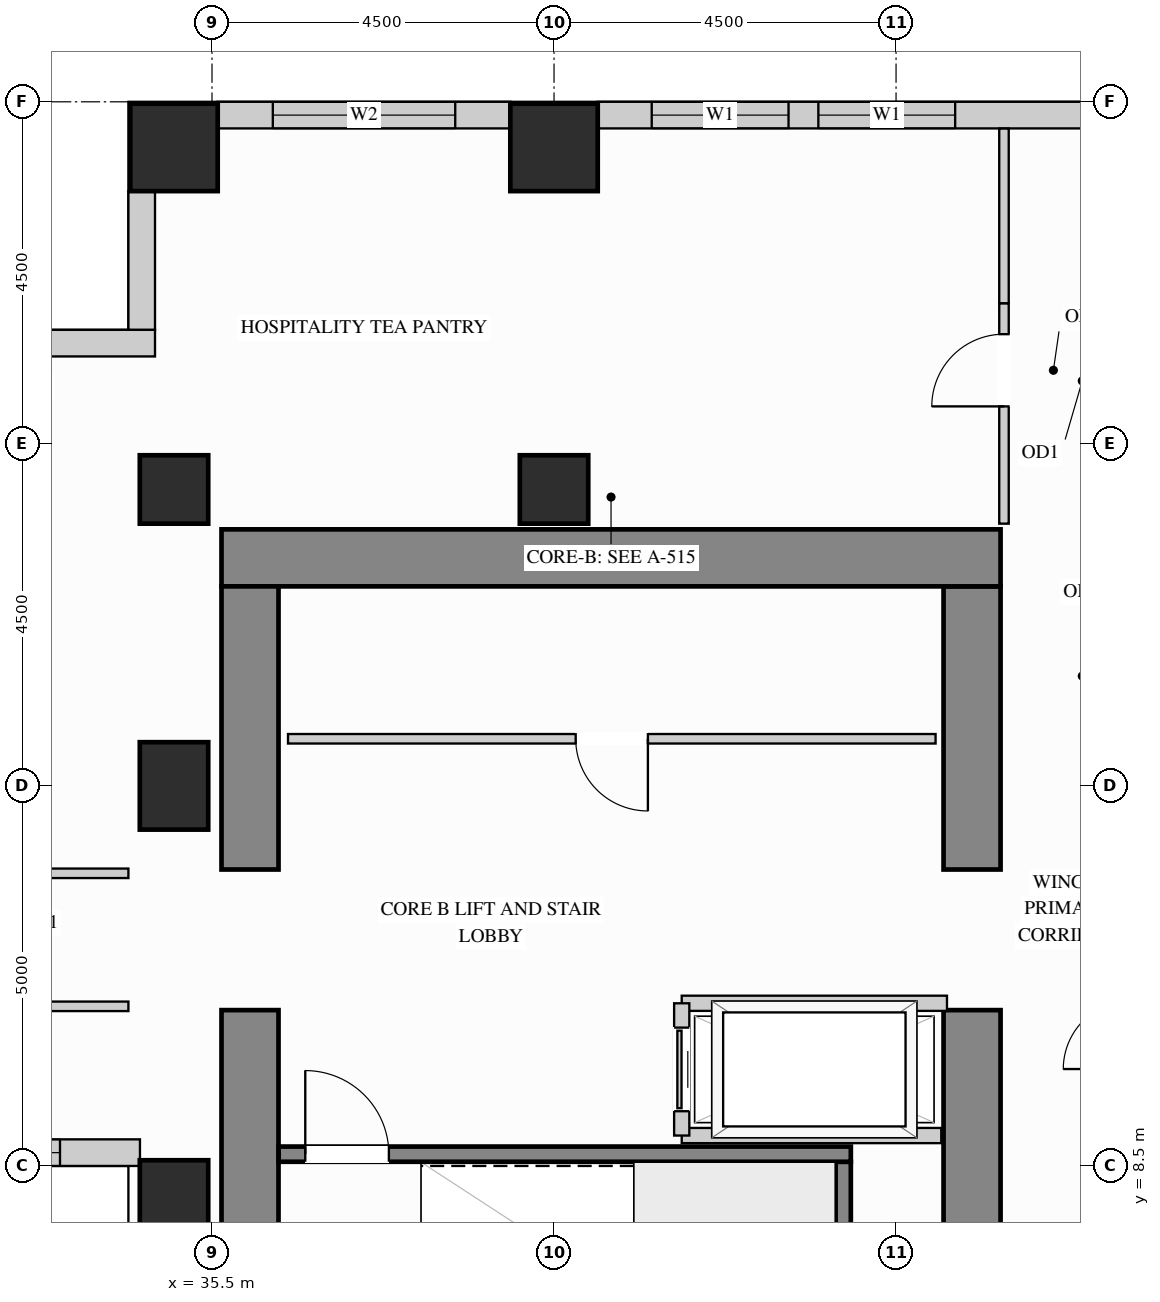
"""IFC4 building model, lengths in metres.
Left out: names, types, materials, properties, quantities, classifications, styles, units other than length and angle.
Written with IfcOpenShell. Run it as: python <this file> out.ifc"""

import sys

from ifc_helpers import new_model, si_unit, direction, frame, frame_2d, origin, origin_2d, place, context, subcontext, project, spatial, rectangle, extrude, source, transform, mapped, element, fill, save


model = new_model("IFC4")
c1 = context("Model", 3, precision=1e-05, world=origin(), true_north=direction((0.0, 1.0)))
c2 = subcontext(c1, "Body", "Model", "MODEL_VIEW")
j1 = project(units=[si_unit("LENGTHUNIT", "METRE"), si_unit("PLANEANGLEUNIT", "RADIAN")], contexts=[c1])
p1 = place(None, origin())
s1 = spatial("IfcSite", under=j1, at=p1, CompositionType="ELEMENT")
p2 = place(p1, origin())
s2 = spatial("IfcBuilding", under=s1, at=p2, CompositionType="ELEMENT")
p3 = place(p2, frame((0.0, 0.0, 124.2)))
s3 = spatial("IfcBuildingStorey", under=s2, at=p3, CompositionType="ELEMENT", Elevation=124.2)
m1 = source(origin(), c2, "Body", "SweptSolid", [
    extrude(rectangle(XDim=0.9, YDim=0.9, at=origin_2d()), origin(), (0.0, 0.0, 1.0), 3.38),
])
for number, where, z_axis, x_axis in (
    (1, (35.0, 17.4, 0.0), (0.0, 0.0, 1.0), (1.0, 0.0, 0.0)),
    (2, (40.0, 17.4, 0.0), (0.0, 0.0, 1.0), (1.0, 0.0, 0.0)),
):
    element("IfcColumn", number, at=place(p3, frame(where, z_axis=z_axis, x_axis=x_axis)), inside=s3, PredefinedType="COLUMN", context=c2, shape_type="MappedRepresentation", body=[
        mapped(m1, transform((0.0, 0.0, 0.0), x_axis=(1.0, 0.0, 0.0), y_axis=(0.0, 1.0, 0.0), z_axis=(0.0, 0.0, 1.0))),
    ])
m2 = source(origin(), c2, "Body", "SweptSolid", [
    extrude(rectangle(XDim=0.9, YDim=1.15, at=origin_2d()), origin(), (0.0, 0.0, 1.0), 3.38),
])
for number, where, z_axis, x_axis in (
    (3, (35.0, 13.5, 0.0), (0.0, 0.0, 1.0), (1.0, 0.0, 0.0)),
    (4, (35.0, 8.0, 0.0), (0.0, 0.0, 1.0), (1.0, 0.0, 0.0)),
):
    element("IfcColumn", number, at=place(p3, frame(where, z_axis=z_axis, x_axis=x_axis)), inside=s3, PredefinedType="COLUMN", context=c2, shape_type="MappedRepresentation", body=[
        mapped(m2, transform((0.0, 0.0, 0.0), x_axis=(1.0, 0.0, 0.0), y_axis=(0.0, 1.0, 0.0), z_axis=(0.0, 0.0, 1.0))),
    ])
m3 = source(origin(), c2, "Body", "SweptSolid", [
    extrude(rectangle(XDim=1.15, YDim=1.15, at=origin_2d()), origin(), (0.0, 0.0, 1.0), 3.38),
])
for number, where, z_axis, x_axis in (
    (5, (35.0, 21.9, 0.0), (0.0, 0.0, 1.0), (1.0, 0.0, 0.0)),
    (6, (40.0, 21.9, 0.0), (0.0, 0.0, 1.0), (1.0, 0.0, 0.0)),
):
    element("IfcColumn", number, at=place(p3, frame(where, z_axis=z_axis, x_axis=x_axis)), inside=s3, PredefinedType="COLUMN", context=c2, shape_type="MappedRepresentation", body=[
        mapped(m3, transform((0.0, 0.0, 0.0), x_axis=(1.0, 0.0, 0.0), y_axis=(0.0, 1.0, 0.0), z_axis=(0.0, 0.0, 1.0))),
    ])
m4 = source(origin(), c2, "Body", "SweptSolid", [
    extrude(rectangle(XDim=5.675, YDim=0.75, at=frame_2d((2.837, 0.0))), origin(), (0.0, 0.0, 1.0), 3.38),
])
p4 = place(p3, frame((45.5, 4.875, 0.0), z_axis=(0.0, 0.0, 1.0), x_axis=(0.0, 1.0, 0.0)))
e7 = element("IfcWall", 7, at=p4, inside=s3, PredefinedType="SHEAR", context=c2, shape_type="MappedRepresentation", body=[
    mapped(m4, transform((0.0, 0.0, 0.0), x_axis=(1.0, 0.0, 0.0), y_axis=(0.0, 1.0, 0.0), z_axis=(0.0, 0.0, 1.0))),
])
m5 = source(origin(), c2, "Body", "SweptSolid", [
    extrude(rectangle(XDim=3.725, YDim=0.75, at=frame_2d((1.863, 0.0))), origin(), (0.0, 0.0, 1.0), 3.38),
])
p5 = place(p3, frame((45.5, 12.4, 0.0), z_axis=(0.0, 0.0, 1.0), x_axis=(0.0, 1.0, 0.0)))
e8 = element("IfcWall", 8, at=p5, inside=s3, PredefinedType="SHEAR", context=c2, shape_type="MappedRepresentation", body=[
    mapped(m5, transform((0.0, 0.0, 0.0), x_axis=(1.0, 0.0, 0.0), y_axis=(0.0, 1.0, 0.0), z_axis=(0.0, 0.0, 1.0))),
])
m6 = source(origin(), c2, "Body", "SweptSolid", [
    extrude(rectangle(XDim=10.25, YDim=0.75, at=frame_2d((5.125, 0.0))), origin(), (0.0, 0.0, 1.0), 3.38),
])
p6 = place(p3, frame((35.625, 16.5, 0.0), z_axis=(0.0, 0.0, 1.0), x_axis=(1.0, 0.0, 0.0)))
e9 = element("IfcWall", 9, at=p6, inside=s3, PredefinedType="SHEAR", context=c2, shape_type="MappedRepresentation", body=[
    mapped(m6, transform((0.0, 0.0, 0.0), x_axis=(1.0, 0.0, 0.0), y_axis=(0.0, 1.0, 0.0), z_axis=(0.0, 0.0, 1.0))),
])
p7 = place(p3, frame((36.0, 4.875, 0.0), z_axis=(0.0, 0.0, 1.0), x_axis=(0.0, 1.0, 0.0)))
e10 = element("IfcWall", 10, at=p7, inside=s3, PredefinedType="SHEAR", context=c2, shape_type="MappedRepresentation", body=[
    mapped(m4, transform((0.0, 0.0, 0.0), x_axis=(1.0, 0.0, 0.0), y_axis=(0.0, 1.0, 0.0), z_axis=(0.0, 0.0, 1.0))),
])
p8 = place(p3, frame((36.0, 12.4, 0.0), z_axis=(0.0, 0.0, 1.0), x_axis=(0.0, 1.0, 0.0)))
e11 = element("IfcWall", 11, at=p8, inside=s3, PredefinedType="SHEAR", context=c2, shape_type="MappedRepresentation", body=[
    mapped(m5, transform((0.0, 0.0, 0.0), x_axis=(1.0, 0.0, 0.0), y_axis=(0.0, 1.0, 0.0), z_axis=(0.0, 0.0, 1.0))),
])
p9 = place(p3, frame((30.948, 8.675, 0.0), z_axis=(0.0, 0.0, 1.0), x_axis=(1.0, 0.0, 0.0)))
e12 = element("IfcWall", 12, at=p9, inside=s3, PredefinedType="SOLIDWALL", context=c2, shape_type="SweptSolid", body=[
    extrude(rectangle(XDim=3.604, YDim=0.35, at=frame_2d((1.802, 0.0))), origin(), (0.0, 0.0, 1.0), 3.365),
])
p10 = place(p9, frame((1.052, 0.0, 0.78)))
e13 = element("IfcOpeningElement", 13, at=p10, cuts=e12, PredefinedType="OPENING", context=c2, shape_type="SweptSolid", body=[
    extrude(rectangle(XDim=1.5, YDim=2.0, at=frame_2d((0.75, 1.0))), frame((0.0, 0.185, 0.0), z_axis=(0.0, -1.0, 0.0), x_axis=(1.0, 0.0, 0.0)), (0.0, 0.0, 1.0), 0.37),
])
p11 = place(p3, frame((47.027, 22.325, 0.0), z_axis=(0.0, 0.0, 1.0), x_axis=(-1.0, 0.0, 0.0)))
e14 = element("IfcWall", 14, at=p11, inside=s3, PredefinedType="SOLIDWALL", context=c2, shape_type="SweptSolid", body=[
    extrude(rectangle(XDim=6.454, YDim=0.35, at=frame_2d((3.227, 0.0))), origin(), (0.0, 0.0, 1.0), 3.365),
])
p12 = place(p11, frame((1.749, 0.0, 0.78)))
e15 = element("IfcOpeningElement", 15, at=p12, cuts=e14, PredefinedType="OPENING", context=c2, shape_type="SweptSolid", body=[
    extrude(rectangle(XDim=1.8, YDim=2.1, at=frame_2d((0.9, 1.05))), frame((0.0, 0.185, 0.0), z_axis=(0.0, -1.0, 0.0), x_axis=(1.0, 0.0, 0.0)), (0.0, 0.0, 1.0), 0.37),
])
p13 = place(p11, frame((3.942, 0.0, 0.78)))
e16 = element("IfcOpeningElement", 16, at=p13, cuts=e14, PredefinedType="OPENING", context=c2, shape_type="SweptSolid", body=[
    extrude(rectangle(XDim=1.8, YDim=2.1, at=frame_2d((0.9, 1.05))), frame((0.0, 0.185, 0.0), z_axis=(0.0, -1.0, 0.0), x_axis=(1.0, 0.0, 0.0)), (0.0, 0.0, 1.0), 0.37),
])
p14 = place(p3, frame((39.427, 22.325, 0.0), z_axis=(0.0, 0.0, 1.0), x_axis=(-1.0, 0.0, 0.0)))
e17 = element("IfcWall", 17, at=p14, inside=s3, PredefinedType="SOLIDWALL", context=c2, shape_type="SweptSolid", body=[
    extrude(rectangle(XDim=3.854, YDim=0.35, at=frame_2d((1.927, 0.0))), origin(), (0.0, 0.0, 1.0), 3.365),
])
p15 = place(p14, frame((0.727, 0.0, 0.78)))
e18 = element("IfcOpeningElement", 18, at=p15, cuts=e17, PredefinedType="OPENING", context=c2, shape_type="SweptSolid", body=[
    extrude(rectangle(XDim=2.4, YDim=2.1, at=frame_2d((1.2, 1.05))), frame((0.0, 0.185, 0.0), z_axis=(0.0, -1.0, 0.0), x_axis=(1.0, 0.0, 0.0)), (0.0, 0.0, 1.0), 0.37),
])
m7 = source(origin(), c2, "Body", "SweptSolid", [
    extrude(rectangle(XDim=1.829, YDim=0.35, at=frame_2d((0.915, 0.0))), origin(), (0.0, 0.0, 1.0), 3.365),
])
p16 = place(p3, frame((34.575, 21.327, 0.0), z_axis=(0.0, 0.0, 1.0), x_axis=(0.0, -1.0, 0.0)))
e19 = element("IfcWall", 19, at=p16, inside=s3, PredefinedType="SOLIDWALL", context=c2, shape_type="MappedRepresentation", body=[
    mapped(m7, transform((0.0, 0.0, 0.0), x_axis=(1.0, 0.0, 0.0), y_axis=(0.0, 1.0, 0.0), z_axis=(0.0, 0.0, 1.0))),
])
p17 = place(p3, frame((34.75, 19.325, 0.0), z_axis=(0.0, 0.0, 1.0), x_axis=(-1.0, 0.0, 0.0)))
e20 = element("IfcWall", 20, at=p17, inside=s3, PredefinedType="SOLIDWALL", context=c2, shape_type="SweptSolid", body=[
    extrude(rectangle(XDim=15.6, YDim=0.35, at=frame_2d((7.8, 0.0))), origin(), (0.0, 0.0, 1.0), 3.365),
])
p18 = place(p17, frame((4.307, 0.0, 0.78)))
e21 = element("IfcOpeningElement", 21, at=p18, cuts=e20, PredefinedType="OPENING", context=c2, shape_type="SweptSolid", body=[
    extrude(rectangle(XDim=1.5, YDim=2.0, at=frame_2d((0.75, 1.0))), frame((0.0, 0.185, 0.0), z_axis=(0.0, -1.0, 0.0), x_axis=(1.0, 0.0, 0.0)), (0.0, 0.0, 1.0), 0.37),
])
p19 = place(p17, frame((9.793, 0.0, 0.78)))
e22 = element("IfcOpeningElement", 22, at=p19, cuts=e20, PredefinedType="OPENING", context=c2, shape_type="SweptSolid", body=[
    extrude(rectangle(XDim=1.5, YDim=2.0, at=frame_2d((0.75, 1.0))), frame((0.0, 0.185, 0.0), z_axis=(0.0, -1.0, 0.0), x_axis=(1.0, 0.0, 0.0)), (0.0, 0.0, 1.0), 0.37),
])
p20 = place(p3, frame((36.5, 14.12, 0.0), z_axis=(0.0, 0.0, 1.0), x_axis=(1.0, 0.0, 0.0)))
e23 = element("IfcWall", 23, at=p20, inside=s3, PredefinedType="PARTITIONING", context=c2, shape_type="SweptSolid", body=[
    extrude(rectangle(XDim=8.52, YDim=0.125, at=frame_2d((4.26, 0.0))), origin(), (0.0, 0.0, 1.0), 3.365),
])
p21 = place(p20, frame((3.785, 0.0, 0.0)))
e24 = element("IfcOpeningElement", 24, at=p21, cuts=e23, PredefinedType="OPENING", context=c2, shape_type="SweptSolid", body=[
    extrude(rectangle(XDim=0.95, YDim=2.15, at=frame_2d((0.475, 1.075))), frame((0.0, 0.073, 0.0), z_axis=(0.0, -1.0, 0.0), x_axis=(1.0, 0.0, 0.0)), (0.0, 0.0, 1.0), 0.145),
])
p22 = place(p3, frame((45.92, 16.95, 0.0), z_axis=(0.0, 0.0, 1.0), x_axis=(0.0, 1.0, 0.0)))
e25 = element("IfcWall", 25, at=p22, inside=s3, PredefinedType="PARTITIONING", context=c2, shape_type="SweptSolid", body=[
    extrude(rectangle(XDim=2.9, YDim=0.125, at=frame_2d((1.45, 0.0))), origin(), (0.0, 0.0, 1.0), 3.365),
])
p23 = place(p22, frame((1.543, 0.0, 0.0)))
e26 = element("IfcOpeningElement", 26, at=p23, cuts=e25, PredefinedType="OPENING", context=c2, shape_type="SweptSolid", body=[
    extrude(rectangle(XDim=0.95, YDim=2.15, at=frame_2d((0.475, 1.075))), frame((0.0, 0.073, 0.0), z_axis=(0.0, -1.0, 0.0), x_axis=(1.0, 0.0, 0.0)), (0.0, 0.0, 1.0), 0.145),
])
m8 = source(origin(), c2, "Body", "SweptSolid", [
    extrude(rectangle(XDim=2.298, YDim=0.125, at=frame_2d((1.149, 0.0))), origin(), (0.0, 0.0, 1.0), 3.365),
])
p24 = place(p3, frame((45.92, 19.85, 0.0), z_axis=(0.0, 0.0, 1.0), x_axis=(0.0, 1.0, 0.0)))
e27 = element("IfcWall", 27, at=p24, inside=s3, PredefinedType="PARTITIONING", context=c2, shape_type="MappedRepresentation", body=[
    mapped(m8, transform((0.0, 0.0, 0.0), x_axis=(1.0, 0.0, 0.0), y_axis=(0.0, 1.0, 0.0), z_axis=(0.0, 0.0, 1.0))),
])
p25 = place(p3, frame((29.85, 12.35, 0.0), z_axis=(0.0, 0.0, 1.0), x_axis=(1.0, 0.0, 0.0)))
e28 = element("IfcWall", 28, at=p25, inside=s3, PredefinedType="PARTITIONING", context=c2, shape_type="SweptSolid", body=[
    extrude(rectangle(XDim=4.55, YDim=0.125, at=frame_2d((2.275, 0.0))), origin(), (0.0, 0.0, 1.0), 3.365),
])
p26 = place(p25, frame((1.8, 0.0, 0.0)))
e29 = element("IfcOpeningElement", 29, at=p26, cuts=e28, PredefinedType="OPENING", context=c2, shape_type="SweptSolid", body=[
    extrude(rectangle(XDim=0.95, YDim=2.15, at=frame_2d((0.475, 1.075))), frame((0.0, 0.073, 0.0), z_axis=(0.0, -1.0, 0.0), x_axis=(1.0, 0.0, 0.0)), (0.0, 0.0, 1.0), 0.145),
])
p27 = place(p3, frame((26.95, 10.6, 0.0), z_axis=(0.0, 0.0, 1.0), x_axis=(1.0, 0.0, 0.0)))
e30 = element("IfcWall", 30, at=p27, inside=s3, PredefinedType="PARTITIONING", context=c2, shape_type="SweptSolid", body=[
    extrude(rectangle(XDim=7.45, YDim=0.125, at=frame_2d((3.725, 0.0))), origin(), (0.0, 0.0, 1.0), 3.365),
])
p28 = place(p27, frame((4.683, 0.0, 0.0)))
e31 = element("IfcOpeningElement", 31, at=p28, cuts=e30, PredefinedType="OPENING", context=c2, shape_type="SweptSolid", body=[
    extrude(rectangle(XDim=0.95, YDim=2.15, at=frame_2d((0.475, 1.075))), frame((0.0, 0.073, 0.0), z_axis=(0.0, -1.0, 0.0), x_axis=(1.0, 0.0, 0.0)), (0.0, 0.0, 1.0), 0.145),
])
m9 = source(origin(), c2, "Body", "SweptSolid", [
    extrude(rectangle(XDim=3.49, YDim=0.2, at=frame_2d((1.745, 0.0))), origin(), (0.0, 0.0, 1.0), 3.365),
])
p29 = place(p3, frame((41.68, 10.64, 0.0), z_axis=(0.0, 0.0, 1.0), x_axis=(1.0, 0.0, 0.0)))
e32 = element("IfcWall", 32, at=p29, inside=s3, PredefinedType="PARTITIONING", context=c2, shape_type="MappedRepresentation", body=[
    mapped(m9, transform((0.0, 0.0, 0.0), x_axis=(1.0, 0.0, 0.0), y_axis=(0.0, 1.0, 0.0), z_axis=(0.0, 0.0, 1.0))),
])
m10 = source(origin(), c2, "Body", "SweptSolid", [
    extrude(rectangle(XDim=3.415, YDim=0.2, at=frame_2d((1.708, 0.0))), origin(), (0.0, 0.0, 1.0), 3.365),
])
p30 = place(p3, frame((41.68, 8.9, 0.0), z_axis=(0.0, 0.0, 1.0), x_axis=(1.0, 0.0, 0.0)))
e33 = element("IfcWall", 33, at=p30, inside=s3, PredefinedType="PARTITIONING", context=c2, shape_type="MappedRepresentation", body=[
    mapped(m10, transform((0.0, 0.0, 0.0), x_axis=(1.0, 0.0, 0.0), y_axis=(0.0, 1.0, 0.0), z_axis=(0.0, 0.0, 1.0))),
])
p31 = place(p3, frame((41.68, 8.9, 0.0), z_axis=(0.0, 0.0, 1.0), x_axis=(0.0, 1.0, 0.0)))
e34 = element("IfcWall", 34, at=p31, inside=s3, PredefinedType="PARTITIONING", context=c2, shape_type="SweptSolid", body=[
    extrude(rectangle(XDim=1.74, YDim=0.2, at=frame_2d((0.87, 0.0))), origin(), (0.0, 0.0, 1.0), 3.365),
])
p32 = place(p31, frame((0.32, 0.0, 0.0)))
e35 = element("IfcOpeningElement", 35, at=p32, cuts=e34, PredefinedType="OPENING", context=c2, shape_type="SweptSolid", body=[
    extrude(rectangle(XDim=1.1, YDim=2.2, at=frame_2d((0.55, 1.1))), frame((0.0, 0.11, 0.0), z_axis=(0.0, -1.0, 0.0), x_axis=(1.0, 0.0, 0.0)), (0.0, 0.0, 1.0), 0.22),
])
m11 = source(origin(), c2, "Body", "SweptSolid", [
    extrude(rectangle(XDim=3.678, YDim=0.2, at=frame_2d((1.839, 0.0))), origin(), (0.0, 0.0, 1.0), 3.38),
])
p33 = place(p3, frame((43.805, 4.877, 0.0), z_axis=(0.0, 0.0, 1.0), x_axis=(0.0, 1.0, 0.0)))
e36 = element("IfcWall", 36, at=p33, inside=s3, PredefinedType="SHEAR", context=c2, shape_type="MappedRepresentation", body=[
    mapped(m11, transform((0.0, 0.0, 0.0), x_axis=(1.0, 0.0, 0.0), y_axis=(0.0, 1.0, 0.0), z_axis=(0.0, 0.0, 1.0))),
])
p34 = place(p3, frame((36.377, 8.655, 0.0), z_axis=(0.0, 0.0, 1.0), x_axis=(1.0, 0.0, 0.0)))
e37 = element("IfcWall", 37, at=p34, inside=s3, PredefinedType="SHEAR", context=c2, shape_type="SweptSolid", body=[
    extrude(rectangle(XDim=7.528, YDim=0.2, at=frame_2d((3.764, 0.0))), origin(), (0.0, 0.0, 1.0), 3.38),
])
p35 = place(p34, frame((0.35, 0.0, 0.0)))
e38 = element("IfcOpeningElement", 38, at=p35, cuts=e37, PredefinedType="OPENING", context=c2, shape_type="SweptSolid", body=[
    extrude(rectangle(XDim=1.1, YDim=2.15, at=frame_2d((0.55, 1.075))), frame((0.0, 0.11, 0.0), z_axis=(0.0, -1.0, 0.0), x_axis=(1.0, 0.0, 0.0)), (0.0, 0.0, 1.0), 0.22),
])
m12 = source(origin(), c2, "Body", "SweptSolid", [
    extrude(rectangle(XDim=1.1, YDim=2.2, at=frame_2d((0.55, 1.1))), frame((0.0, 0.025, 0.0), z_axis=(0.0, -1.0, 0.0), x_axis=(1.0, 0.0, 0.0)), (0.0, 0.0, 1.0), 0.05),
])
p36 = place(p32, origin())
e39 = element("IfcDoor", 39, at=p36, inside=s3, OperationType="SLIDING_TO_LEFT", PredefinedType="DOOR", context=c2, shape_type="MappedRepresentation", body=[
    mapped(m12, transform((0.0, 0.0, 0.0), x_axis=(1.0, 0.0, 0.0), y_axis=(0.0, 1.0, 0.0), z_axis=(0.0, 0.0, 1.0))),
])
fill(e35, e39)
m13 = source(origin(), c2, "Body", "SweptSolid", [
    extrude(rectangle(XDim=0.95, YDim=2.15, at=frame_2d((0.475, 1.075))), frame((0.0, 0.025, 0.0), z_axis=(0.0, -1.0, 0.0), x_axis=(1.0, 0.0, 0.0)), (0.0, 0.0, 1.0), 0.05),
])
p37 = place(p21, origin())
e40 = element("IfcDoor", 40, at=p37, inside=s3, OperationType="SINGLE_SWING_RIGHT", PredefinedType="DOOR", context=c2, shape_type="MappedRepresentation", body=[
    mapped(m13, transform((0.0, 0.0, 0.0), x_axis=(1.0, 0.0, 0.0), y_axis=(0.0, 1.0, 0.0), z_axis=(0.0, 0.0, 1.0))),
])
fill(e24, e40)
p38 = place(p23, origin())
e41 = element("IfcDoor", 41, at=p38, inside=s3, OperationType="SINGLE_SWING_LEFT", PredefinedType="DOOR", context=c2, shape_type="MappedRepresentation", body=[
    mapped(m13, transform((0.0, 0.0, 0.0), x_axis=(1.0, 0.0, 0.0), y_axis=(0.0, 1.0, 0.0), z_axis=(0.0, 0.0, 1.0))),
])
fill(e26, e41)
m14 = source(origin(), c2, "Body", "SweptSolid", [
    extrude(rectangle(XDim=1.1, YDim=2.15, at=frame_2d((0.55, 1.075))), frame((0.0, 0.025, 0.0), z_axis=(0.0, -1.0, 0.0), x_axis=(1.0, 0.0, 0.0)), (0.0, 0.0, 1.0), 0.05),
])
p39 = place(p35, origin())
e42 = element("IfcDoor", 42, at=p39, inside=s3, OperationType="SINGLE_SWING_LEFT", PredefinedType="DOOR", context=c2, shape_type="MappedRepresentation", body=[
    mapped(m14, transform((0.0, 0.0, 0.0), x_axis=(1.0, 0.0, 0.0), y_axis=(0.0, 1.0, 0.0), z_axis=(0.0, 0.0, 1.0))),
])
fill(e38, e42)
m15 = source(origin(), c2, "Body", "SweptSolid", [
    extrude(rectangle(XDim=1.8, YDim=2.1, at=frame_2d((0.9, 1.05))), frame((0.0, 0.03, 0.0), z_axis=(0.0, -1.0, 0.0), x_axis=(1.0, 0.0, 0.0)), (0.0, 0.0, 1.0), 0.06),
])
p40 = place(p12, origin())
e43 = element("IfcWindow", 43, at=p40, inside=s3, PartitioningType="SINGLE_PANEL", PredefinedType="WINDOW", context=c2, shape_type="MappedRepresentation", body=[
    mapped(m15, transform((0.0, 0.0, 0.0), x_axis=(1.0, 0.0, 0.0), y_axis=(0.0, 1.0, 0.0), z_axis=(0.0, 0.0, 1.0))),
])
fill(e15, e43)
p41 = place(p13, origin())
e44 = element("IfcWindow", 44, at=p41, inside=s3, PartitioningType="SINGLE_PANEL", PredefinedType="WINDOW", context=c2, shape_type="MappedRepresentation", body=[
    mapped(m15, transform((0.0, 0.0, 0.0), x_axis=(1.0, 0.0, 0.0), y_axis=(0.0, 1.0, 0.0), z_axis=(0.0, 0.0, 1.0))),
])
fill(e16, e44)
m16 = source(origin(), c2, "Body", "SweptSolid", [
    extrude(rectangle(XDim=2.4, YDim=2.1, at=frame_2d((1.2, 1.05))), frame((0.0, 0.03, 0.0), z_axis=(0.0, -1.0, 0.0), x_axis=(1.0, 0.0, 0.0)), (0.0, 0.0, 1.0), 0.06),
])
p42 = place(p15, origin())
e45 = element("IfcWindow", 45, at=p42, inside=s3, PartitioningType="SINGLE_PANEL", PredefinedType="WINDOW", context=c2, shape_type="MappedRepresentation", body=[
    mapped(m16, transform((0.0, 0.0, 0.0), x_axis=(1.0, 0.0, 0.0), y_axis=(0.0, 1.0, 0.0), z_axis=(0.0, 0.0, 1.0))),
])
fill(e18, e45)
m17 = source(origin(), c2, "Body", "SweptSolid", [
    extrude(rectangle(XDim=1.5, YDim=2.0, at=frame_2d((0.75, 1.0))), frame((0.0, 0.03, 0.0), z_axis=(0.0, -1.0, 0.0), x_axis=(1.0, 0.0, 0.0)), (0.0, 0.0, 1.0), 0.06),
])
p43 = place(p10, origin())
e46 = element("IfcWindow", 46, at=p43, inside=s3, PartitioningType="SINGLE_PANEL", PredefinedType="WINDOW", context=c2, shape_type="MappedRepresentation", body=[
    mapped(m17, transform((0.0, 0.0, 0.0), x_axis=(1.0, 0.0, 0.0), y_axis=(0.0, 1.0, 0.0), z_axis=(0.0, 0.0, 1.0))),
])
fill(e13, e46)
save(model, sys.argv[1])
